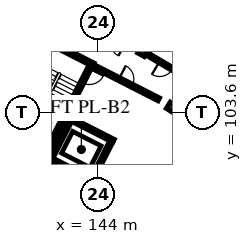
"""IFC4 building model, lengths in metres.
Left out: names, types, materials, properties, quantities, classifications, styles, units other than length and angle.
Written with IfcOpenShell. Run it as: python <this file> out.ifc"""

import sys

from ifc_helpers import new_model, si_unit, direction, frame, frame_2d, origin, origin_2d, place, context, subcontext, project, spatial, rectangle, extrude, element, fill, save


model = new_model("IFC4")
c1 = context("Model", 3, precision=1e-05, world=origin(), true_north=direction((0.0, 1.0)))
c2 = subcontext(c1, "Body", "Model", "MODEL_VIEW")
j1 = project(units=[si_unit("LENGTHUNIT", "METRE"), si_unit("PLANEANGLEUNIT", "RADIAN")], contexts=[c1])
p1 = place(None, origin())
s1 = spatial("IfcSite", under=j1, at=p1, CompositionType="ELEMENT")
p2 = place(p1, origin())
s2 = spatial("IfcBuilding", under=s1, at=p2, CompositionType="ELEMENT")
p3 = place(p2, frame((0.0, 0.0, 29.0)))
s3 = spatial("IfcBuildingStorey", under=s2, at=p3, CompositionType="ELEMENT", Elevation=29.0)
p4 = place(p3, frame((140.629, 108.307, 0.0), z_axis=(0.0, 0.0, 1.0), x_axis=(0.891032414707, -0.453939683153, 0.0)))
e1 = element("IfcWall", 1, at=p4, inside=s3, PredefinedType="SHEAR", context=c2, shape_type="SweptSolid", body=[
    extrude(rectangle(XDim=3.42, YDim=0.25, at=frame_2d((1.71, 0.0))), origin(), (0.0, 0.0, 1.0), 3.11),
])
p5 = place(p3, frame((143.509, 106.699, 0.0), z_axis=(0.0, 0.0, 1.0), x_axis=(-0.453992276384, -0.891005618941, 0.0)))
e2 = element("IfcWall", 2, at=p5, inside=s3, PredefinedType="SHEAR", context=c2, shape_type="SweptSolid", body=[
    extrude(rectangle(XDim=6.6, YDim=0.25, at=frame_2d((3.3, 0.0))), origin(), (0.0, 0.0, 1.0), 3.11),
])
p6 = place(p5, frame((0.22, 0.0, 0.0)))
e3 = element("IfcOpeningElement", 3, at=p6, cuts=e2, PredefinedType="OPENING", context=c2, shape_type="SweptSolid", body=[
    extrude(rectangle(XDim=1.05, YDim=2.15, at=frame_2d((0.525, 1.075))), frame((0.0, 0.135, 0.0), z_axis=(0.0, -1.0, 0.0), x_axis=(1.0, 0.0, 0.0)), (0.0, 0.0, 1.0), 0.27),
])
p7 = place(p3, frame((142.103, 103.224, 0.0), z_axis=(0.0, 0.0, 1.0), x_axis=(0.891001200497, -0.454000947921, 0.0)))
e4 = element("IfcWall", 4, at=p7, inside=s3, PredefinedType="SHEAR", context=c2, shape_type="SweptSolid", body=[
    extrude(rectangle(XDim=3.26, YDim=0.23, at=frame_2d((1.63, 0.0))), origin(), (0.0, 0.0, 1.0), 3.11),
])
p8 = place(p7, frame((0.9, 0.0, 0.0)))
e5 = element("IfcOpeningElement", 5, at=p8, cuts=e4, PredefinedType="OPENING", context=c2, shape_type="SweptSolid", body=[
    extrude(rectangle(XDim=1.0, YDim=2.15, at=frame_2d((0.5, 1.075))), frame((0.0, 0.125, 0.0), z_axis=(0.0, -1.0, 0.0), x_axis=(1.0, 0.0, 0.0)), (0.0, 0.0, 1.0), 0.25),
])
p9 = place(p3, frame((140.772, 100.613, 0.0), z_axis=(0.0, 0.0, 1.0), x_axis=(0.891016635648, -0.453970654337, 0.0)))
e6 = element("IfcWall", 6, at=p9, inside=s3, PredefinedType="SHEAR", context=c2, shape_type="SweptSolid", body=[
    extrude(rectangle(XDim=3.26, YDim=0.23, at=frame_2d((1.63, 0.0))), origin(), (0.0, 0.0, 1.0), 3.11),
])
for number, where, z_axis, x_axis in (
    (7, (142.153, 103.069, 0.0), (0.0, 0.0, 1.0), (-0.454, -0.891, 0.0)),
    (8, (144.853, 101.694, 0.0), (0.0, 0.0, 1.0), (-0.454, -0.891, 0.0)),
):
    element("IfcWall", number, at=place(p3, frame(where, z_axis=z_axis, x_axis=x_axis)), inside=s3, PredefinedType="SHEAR", context=c2, shape_type="SweptSolid", body=[
        extrude(rectangle(XDim=2.7, YDim=0.23, at=frame_2d((1.35, 0.0))), origin(), (0.0, 0.0, 1.0), 3.11),
    ])
for number, where, z_axis, x_axis in (
    (9, (148.817, 103.957, 0.0), (0.0, 0.0, 1.0), (0.536, 0.844, 0.0)),
    (10, (146.928, 107.625, 0.0), (0.0, 0.0, 1.0), (0.48, 0.877, 0.0)),
):
    element("IfcColumn", number, at=place(p3, frame(where, z_axis=z_axis, x_axis=x_axis)), inside=s3, PredefinedType="COLUMN", context=c2, shape_type="SweptSolid", body=[
        extrude(rectangle(XDim=0.5, YDim=0.5, at=origin_2d()), origin(), (0.0, 0.0, 1.0), 3.115),
    ])
p10 = place(p3, frame((143.625, 106.696, 0.0), z_axis=(0.0, 0.0, 1.0), x_axis=(0.891003372311, -0.453996685595, 0.0)))
e11 = element("IfcWall", 11, at=p10, inside=s3, PredefinedType="PARTITIONING", context=c2, shape_type="SweptSolid", body=[
    extrude(rectangle(XDim=4.9, YDim=0.22, at=frame_2d((2.45, 0.0))), origin(), (0.0, 0.0, 1.0), 2.34),
])
p11 = place(p10, frame((1.95, 0.0, 0.0)))
e12 = element("IfcOpeningElement", 12, at=p11, cuts=e11, PredefinedType="OPENING", context=c2, shape_type="SweptSolid", body=[
    extrude(rectangle(XDim=0.98, YDim=2.14, at=frame_2d((0.49, 1.07))), frame((0.0, 0.12, 0.0), z_axis=(0.0, -1.0, 0.0), x_axis=(1.0, 0.0, 0.0)), (0.0, 0.0, 1.0), 0.24),
])
p12 = place(p3, frame((147.503, 96.382, 0.0), z_axis=(0.0, 0.0, 1.0), x_axis=(0.590924179316, 0.806727100263, 0.0)))
e13 = element("IfcWall", 13, at=p12, inside=s3, PredefinedType="PARTITIONING", context=c2, shape_type="SweptSolid", body=[
    extrude(rectangle(XDim=6.6, YDim=0.125, at=frame_2d((3.3, 0.0))), origin(), (0.0, 0.0, 1.0), 2.37),
])
p13 = place(p12, frame((2.845, 0.0, 0.0)))
e14 = element("IfcOpeningElement", 14, at=p13, cuts=e13, PredefinedType="OPENING", context=c2, shape_type="SweptSolid", body=[
    extrude(rectangle(XDim=0.91, YDim=2.1, at=frame_2d((0.455, 1.05))), frame((0.0, 0.073, 0.0), z_axis=(0.0, -1.0, 0.0), x_axis=(1.0, 0.0, 0.0)), (0.0, 0.0, 1.0), 0.145),
])
p14 = place(p3, frame((149.695, 105.991, 0.0), z_axis=(0.0, 0.0, 1.0), x_axis=(-0.861113214678, 0.508413248753, 0.0)))
e15 = element("IfcWall", 15, at=p14, inside=s3, PredefinedType="PARTITIONING", context=c2, shape_type="SweptSolid", body=[
    extrude(rectangle(XDim=2.863, YDim=0.205, at=frame_2d((1.432, 0.0))), origin(), (0.0, 0.0, 1.0), 2.37),
])
p15 = place(p14, frame((0.937, 0.0, 0.0)))
e16 = element("IfcOpeningElement", 16, at=p15, cuts=e15, PredefinedType="OPENING", context=c2, shape_type="SweptSolid", body=[
    extrude(rectangle(XDim=0.99, YDim=2.16, at=frame_2d((0.495, 1.08))), frame((0.0, 0.113, 0.0), z_axis=(0.0, -1.0, 0.0), x_axis=(1.0, 0.0, 0.0)), (0.0, 0.0, 1.0), 0.225),
])
p16 = place(p6, origin())
e17 = element("IfcDoor", 17, at=p16, inside=s3, OperationType="SINGLE_SWING_LEFT", PredefinedType="DOOR", context=c2, shape_type="SweptSolid", body=[
    extrude(rectangle(XDim=1.05, YDim=2.15, at=frame_2d((0.525, 1.075))), frame((0.0, 0.025, 0.0), z_axis=(0.0, -1.0, 0.0), x_axis=(1.0, 0.0, 0.0)), (0.0, 0.0, 1.0), 0.05),
])
fill(e3, e17)
p17 = place(p8, origin())
e18 = element("IfcDoor", 18, at=p17, inside=s3, OperationType="DOUBLE_DOOR_SLIDING", PredefinedType="DOOR", context=c2, shape_type="SweptSolid", body=[
    extrude(rectangle(XDim=1.0, YDim=2.15, at=frame_2d((0.5, 1.075))), frame((0.0, 0.025, 0.0), z_axis=(0.0, -1.0, 0.0), x_axis=(1.0, 0.0, 0.0)), (0.0, 0.0, 1.0), 0.05),
])
fill(e5, e18)
p18 = place(p11, origin())
e19 = element("IfcDoor", 19, at=p18, inside=s3, OperationType="SINGLE_SWING_LEFT", PredefinedType="DOOR", context=c2, shape_type="SweptSolid", body=[
    extrude(rectangle(XDim=0.98, YDim=2.14, at=frame_2d((0.49, 1.07))), frame((0.0, 0.025, 0.0), z_axis=(0.0, -1.0, 0.0), x_axis=(1.0, 0.0, 0.0)), (0.0, 0.0, 1.0), 0.05),
])
fill(e12, e19)
p19 = place(p15, origin())
e20 = element("IfcDoor", 20, at=p19, inside=s3, OperationType="SINGLE_SWING_RIGHT", PredefinedType="DOOR", context=c2, shape_type="SweptSolid", body=[
    extrude(rectangle(XDim=0.99, YDim=2.16, at=frame_2d((0.495, 1.08))), frame((0.0, 0.025, 0.0), z_axis=(0.0, -1.0, 0.0), x_axis=(1.0, 0.0, 0.0)), (0.0, 0.0, 1.0), 0.05),
])
fill(e16, e20)
save(model, sys.argv[1])
